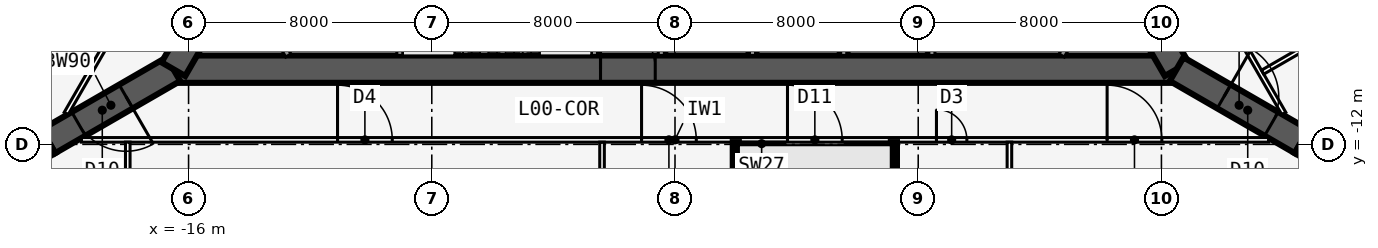
"""IFC4 building model, lengths in metres.
Left out: names, types, materials, properties, quantities, classifications, styles, units other than length and angle.
Written with IfcOpenShell. Run it as: python <this file> out.ifc"""

import sys

from ifc_helpers import new_model, si_unit, direction, frame, frame_2d, origin, place, context, subcontext, project, spatial, rectangle, extrude, element, fill, save


model = new_model("IFC4")
c1 = context("Model", 3, precision=1e-05, world=origin(), true_north=direction((0.0, 1.0)))
c2 = subcontext(c1, "Body", "Model", "MODEL_VIEW")
j1 = project(units=[si_unit("LENGTHUNIT", "METRE"), si_unit("PLANEANGLEUNIT", "RADIAN")], contexts=[c1])
p1 = place(None, origin())
s1 = spatial("IfcSite", under=j1, at=p1, CompositionType="ELEMENT")
p2 = place(p1, origin())
s2 = spatial("IfcBuilding", under=s1, at=p2, CompositionType="ELEMENT")
p3 = place(p2, origin())
s3 = spatial("IfcBuildingStorey", under=s2, at=p3, CompositionType="ELEMENT", Elevation=0.0)
p4 = place(p3, frame((-16.5, -9.526, -0.3), z_axis=(0.0, 0.0, 1.0), x_axis=(1.0, 0.0, 0.0)))
e1 = element("IfcWall", 1, at=p4, inside=s3, PredefinedType="SHEAR", context=c2, shape_type="SweptSolid", body=[
    extrude(rectangle(XDim=33.0, YDim=0.9, at=frame_2d((16.5, 0.0))), origin(), (0.0, 0.0, 1.0), 6.3),
])
p5 = place(p4, frame((14.05, 0.0, 0.3)))
e2 = element("IfcOpeningElement", 2, at=p5, cuts=e1, PredefinedType="OPENING", context=c2, shape_type="SweptSolid", body=[
    extrude(rectangle(XDim=1.8, YDim=2.13, at=frame_2d((0.9, 1.065))), frame((0.0, 0.46, 0.0), z_axis=(0.0, -1.0, 0.0), x_axis=(1.0, 0.0, 0.0)), (0.0, 0.0, 1.0), 0.92),
])
p6 = place(p3, frame((-9.05, -5.951, -0.3), z_axis=(0.0, 0.0, 1.0), x_axis=(0.0, -1.0, 0.0)))
e3 = element("IfcWall", 3, at=p6, inside=s3, PredefinedType="SOLIDWALL", context=c2, shape_type="SweptSolid", body=[
    extrude(rectangle(XDim=3.125, YDim=0.2, at=frame_2d((1.562, 0.0))), origin(), (0.0, 0.0, 1.0), 6.05),
])
p7 = place(p3, frame((-2.65, -5.951, -0.3), z_axis=(0.0, 0.0, 1.0), x_axis=(0.0, -1.0, 0.0)))
e4 = element("IfcWall", 4, at=p7, inside=s3, PredefinedType="SOLIDWALL", context=c2, shape_type="SweptSolid", body=[
    extrude(rectangle(XDim=3.125, YDim=0.2, at=frame_2d((1.562, 0.0))), origin(), (0.0, 0.0, 1.0), 6.05),
])
p8 = place(p7, frame((1.525, 0.0, 0.3)))
e5 = element("IfcOpeningElement", 5, at=p8, cuts=e4, PredefinedType="OPENING", context=c2, shape_type="SweptSolid", body=[
    extrude(rectangle(XDim=1.0, YDim=2.13, at=frame_2d((0.5, 1.065))), frame((0.0, 0.11, 0.0), z_axis=(0.0, -1.0, 0.0), x_axis=(1.0, 0.0, 0.0)), (0.0, 0.0, 1.0), 0.22),
])
for number, where, z_axis, x_axis in (
    (6, (-0.45, -5.951, -0.3), (0.0, 0.0, 1.0), (0.0, -1.0, 0.0)),
    (7, (2.55, -5.951, -0.3), (0.0, 0.0, 1.0), (0.0, -1.0, 0.0)),
    (8, (5.55, -5.951, -0.3), (0.0, 0.0, 1.0), (0.0, -1.0, 0.0)),
    (9, (8.45, -5.951, -0.3), (0.0, 0.0, 1.0), (0.0, -1.0, 0.0)),
):
    element("IfcWall", number, at=place(p3, frame(where, z_axis=z_axis, x_axis=x_axis)), inside=s3, PredefinedType="SOLIDWALL", context=c2, shape_type="SweptSolid", body=[
        extrude(rectangle(XDim=3.125, YDim=0.2, at=frame_2d((1.562, 0.0))), origin(), (0.0, 0.0, 1.0), 6.05),
    ])
p9 = place(p3, frame((16.5, -9.526, -0.3), z_axis=(0.0, 0.0, 1.0), x_axis=(-0.499999749417, 0.866025548458, 0.0)))
e10 = element("IfcWall", 10, at=p9, inside=s3, PredefinedType="SHEAR", context=c2, shape_type="SweptSolid", body=[
    extrude(rectangle(XDim=33.0, YDim=0.9, at=frame_2d((16.5, 0.0))), origin(), (0.0, 0.0, 1.0), 6.3),
])
p10 = place(p9, frame((14.15, 0.0, 0.3)))
e11 = element("IfcOpeningElement", 11, at=p10, cuts=e10, PredefinedType="OPENING", context=c2, shape_type="SweptSolid", body=[
    extrude(rectangle(XDim=1.8, YDim=2.13, at=frame_2d((0.9, 1.065))), frame((0.0, 0.46, 0.0), z_axis=(0.0, -1.0, 0.0), x_axis=(1.0, 0.0, 0.0)), (0.0, 0.0, 1.0), 0.92),
])
p11 = place(p9, frame((12.6, 0.0, 0.3)))
e12 = element("IfcOpeningElement", 12, at=p11, cuts=e10, PredefinedType="OPENING", context=c2, shape_type="SweptSolid", body=[
    extrude(rectangle(XDim=1.0, YDim=2.13, at=frame_2d((0.5, 1.065))), frame((0.0, 0.46, 0.0), z_axis=(0.0, -1.0, 0.0), x_axis=(1.0, 0.0, 0.0)), (0.0, 0.0, 1.0), 0.92),
])
p12 = place(p3, frame((0.0, 19.052, -0.3), z_axis=(0.0, 0.0, 1.0), x_axis=(-0.499999749417, -0.866025548458, 0.0)))
e13 = element("IfcWall", 13, at=p12, inside=s3, PredefinedType="SHEAR", context=c2, shape_type="SweptSolid", body=[
    extrude(rectangle(XDim=33.0, YDim=0.9, at=frame_2d((16.5, 0.0))), origin(), (0.0, 0.0, 1.0), 6.3),
])
p13 = place(p12, frame((14.15, 0.0, 0.3)))
e14 = element("IfcOpeningElement", 14, at=p13, cuts=e13, PredefinedType="OPENING", context=c2, shape_type="SweptSolid", body=[
    extrude(rectangle(XDim=1.8, YDim=2.13, at=frame_2d((0.9, 1.065))), frame((0.0, 0.46, 0.0), z_axis=(0.0, -1.0, 0.0), x_axis=(1.0, 0.0, 0.0)), (0.0, 0.0, 1.0), 0.92),
])
p14 = place(p12, frame((12.6, 0.0, 0.3)))
e15 = element("IfcOpeningElement", 15, at=p14, cuts=e13, PredefinedType="OPENING", context=c2, shape_type="SweptSolid", body=[
    extrude(rectangle(XDim=1.0, YDim=2.13, at=frame_2d((0.5, 1.065))), frame((0.0, 0.46, 0.0), z_axis=(0.0, -1.0, 0.0), x_axis=(1.0, 0.0, 0.0)), (0.0, 0.0, 1.0), 0.92),
])
p15 = place(p3, frame((16.5, -9.526, -0.3), z_axis=(0.0, 0.0, 1.0), x_axis=(0.866031398331, -0.499989616998, 0.0)))
e16 = element("IfcWall", 16, at=p15, inside=s3, PredefinedType="SHEAR", context=c2, shape_type="SweptSolid", body=[
    extrude(rectangle(XDim=4.746, YDim=0.9, at=frame_2d((2.373, 0.0))), origin(), (0.0, 0.0, 1.0), 6.3),
])
p16 = place(p15, frame((1.8, 0.0, 0.3)))
e17 = element("IfcOpeningElement", 17, at=p16, cuts=e16, PredefinedType="OPENING", context=c2, shape_type="SweptSolid", body=[
    extrude(rectangle(XDim=1.8, YDim=2.13, at=frame_2d((0.9, 1.065))), frame((0.0, 0.46, 0.0), z_axis=(0.0, -1.0, 0.0), x_axis=(1.0, 0.0, 0.0)), (0.0, 0.0, 1.0), 0.92),
])
p17 = place(p3, frame((20.61, -11.899, -0.3), z_axis=(0.0, 0.0, 1.0), x_axis=(0.866009537788, -0.500027479704, 0.0)))
e18 = element("IfcWall", 18, at=p17, inside=s3, PredefinedType="SHEAR", context=c2, shape_type="SweptSolid", body=[
    extrude(rectangle(XDim=1.155, YDim=0.9, at=frame_2d((0.577, 0.0))), origin(), (0.0, 0.0, 1.0), 6.3),
])
p18 = place(p3, frame((-16.5, -9.526, -0.3), z_axis=(0.0, 0.0, 1.0), x_axis=(-0.866031398331, -0.499989616998, 0.0)))
e19 = element("IfcWall", 19, at=p18, inside=s3, PredefinedType="SHEAR", context=c2, shape_type="SweptSolid", body=[
    extrude(rectangle(XDim=4.746, YDim=0.9, at=frame_2d((2.373, 0.0))), origin(), (0.0, 0.0, 1.0), 6.3),
])
p19 = place(p18, frame((1.8, 0.0, 0.3)))
e20 = element("IfcOpeningElement", 20, at=p19, cuts=e19, PredefinedType="OPENING", context=c2, shape_type="SweptSolid", body=[
    extrude(rectangle(XDim=1.8, YDim=2.13, at=frame_2d((0.9, 1.065))), frame((0.0, 0.46, 0.0), z_axis=(0.0, -1.0, 0.0), x_axis=(1.0, 0.0, 0.0)), (0.0, 0.0, 1.0), 0.92),
])
p20 = place(p3, frame((-20.61, -11.899, -0.3), z_axis=(0.0, 0.0, 1.0), x_axis=(-0.866009537788, -0.500027479704, 0.0)))
e21 = element("IfcWall", 21, at=p20, inside=s3, PredefinedType="SHEAR", context=c2, shape_type="SweptSolid", body=[
    extrude(rectangle(XDim=1.155, YDim=0.9, at=frame_2d((0.577, 0.0))), origin(), (0.0, 0.0, 1.0), 6.3),
])
p21 = place(p3, frame((-19.527, -11.851, -0.3), z_axis=(0.0, 0.0, 1.0), x_axis=(1.0, 0.0, 0.0)))
e22 = element("IfcWall", 22, at=p21, inside=s3, PredefinedType="PARTITIONING", context=c2, shape_type="SweptSolid", body=[
    extrude(rectangle(XDim=39.054, YDim=0.15, at=frame_2d((19.527, 0.0))), origin(), (0.0, 0.0, 1.0), 5.108),
])
p22 = place(p21, frame((8.427, 0.0, 0.3)))
e23 = element("IfcOpeningElement", 23, at=p22, cuts=e22, PredefinedType="OPENING", context=c2, shape_type="SweptSolid", body=[
    extrude(rectangle(XDim=1.8, YDim=2.13, at=frame_2d((0.9, 1.065))), frame((0.0, 0.085, 0.0), z_axis=(0.0, -1.0, 0.0), x_axis=(1.0, 0.0, 0.0)), (0.0, 0.0, 1.0), 0.17),
])
p23 = place(p21, frame((18.427, 0.0, 0.3)))
e24 = element("IfcOpeningElement", 24, at=p23, cuts=e22, PredefinedType="OPENING", context=c2, shape_type="SweptSolid", body=[
    extrude(rectangle(XDim=1.8, YDim=2.13, at=frame_2d((0.9, 1.065))), frame((0.0, 0.085, 0.0), z_axis=(0.0, -1.0, 0.0), x_axis=(1.0, 0.0, 0.0)), (0.0, 0.0, 1.0), 0.17),
])
p24 = place(p21, frame((23.227, 0.0, 0.3)))
e25 = element("IfcOpeningElement", 25, at=p24, cuts=e22, PredefinedType="OPENING", context=c2, shape_type="SweptSolid", body=[
    extrude(rectangle(XDim=1.8, YDim=2.13, at=frame_2d((0.9, 1.065))), frame((0.0, 0.085, 0.0), z_axis=(0.0, -1.0, 0.0), x_axis=(1.0, 0.0, 0.0)), (0.0, 0.0, 1.0), 0.17),
])
p25 = place(p21, frame((28.127, 0.0, 0.3)))
e26 = element("IfcOpeningElement", 26, at=p25, cuts=e22, PredefinedType="OPENING", context=c2, shape_type="SweptSolid", body=[
    extrude(rectangle(XDim=1.0, YDim=2.13, at=frame_2d((0.5, 1.065))), frame((0.0, 0.085, 0.0), z_axis=(0.0, -1.0, 0.0), x_axis=(1.0, 0.0, 0.0)), (0.0, 0.0, 1.0), 0.17),
])
p26 = place(p21, frame((33.74, 0.0, 0.3)))
e27 = element("IfcOpeningElement", 27, at=p26, cuts=e22, PredefinedType="OPENING", context=c2, shape_type="SweptSolid", body=[
    extrude(rectangle(XDim=1.8, YDim=2.13, at=frame_2d((0.9, 1.065))), frame((0.0, 0.085, 0.0), z_axis=(0.0, -1.0, 0.0), x_axis=(1.0, 0.0, 0.0)), (0.0, 0.0, 1.0), 0.17),
])
p27 = place(p3, frame((-18.0, -11.926, -0.3), z_axis=(0.0, 0.0, 1.0), x_axis=(0.0, -1.0, 0.0)))
e28 = element("IfcWall", 28, at=p27, inside=s3, PredefinedType="PARTITIONING", context=c2, shape_type="SweptSolid", body=[
    extrude(rectangle(XDim=20.399, YDim=0.15, at=frame_2d((10.2, 0.0))), origin(), (0.0, 0.0, 1.0), 6.05),
])
p28 = place(p3, frame((-2.4, -11.926, -0.3), z_axis=(0.0, 0.0, 1.0), x_axis=(0.0, -1.0, 0.0)))
e29 = element("IfcWall", 29, at=p28, inside=s3, PredefinedType="PARTITIONING", context=c2, shape_type="SweptSolid", body=[
    extrude(rectangle(XDim=20.79, YDim=0.15, at=frame_2d((10.395, 0.0))), origin(), (0.0, 0.0, 1.0), 6.05),
])
p29 = place(p3, frame((2.0, -11.926, -0.3), z_axis=(0.0, 0.0, 1.0), x_axis=(0.0, -1.0, 0.0)))
e30 = element("IfcWall", 30, at=p29, inside=s3, PredefinedType="SHEAR", context=c2, shape_type="SweptSolid", body=[
    extrude(rectangle(XDim=20.795, YDim=0.2, at=frame_2d((10.397, 0.0))), origin(), (0.0, 0.0, 1.0), 6.3),
])
p30 = place(p3, frame((7.2, -11.926, -0.3), z_axis=(0.0, 0.0, 1.0), x_axis=(0.0, -1.0, 0.0)))
e31 = element("IfcWall", 31, at=p30, inside=s3, PredefinedType="SHEAR", context=c2, shape_type="SweptSolid", body=[
    extrude(rectangle(XDim=20.734, YDim=0.2, at=frame_2d((10.367, 0.0))), origin(), (0.0, 0.0, 1.0), 6.3),
])
p31 = place(p3, frame((11.0, -11.926, -0.3), z_axis=(0.0, 0.0, 1.0), x_axis=(0.0, -1.0, 0.0)))
e32 = element("IfcWall", 32, at=p31, inside=s3, PredefinedType="PARTITIONING", context=c2, shape_type="SweptSolid", body=[
    extrude(rectangle(XDim=20.644, YDim=0.15, at=frame_2d((10.322, 0.0))), origin(), (0.0, 0.0, 1.0), 6.05),
])
p32 = place(p3, frame((20.027, -10.985, -0.3), z_axis=(0.0, 0.0, 1.0), x_axis=(-0.500001677587, 0.866024435227, 0.0)))
e33 = element("IfcWall", 33, at=p32, inside=s3, PredefinedType="PARTITIONING", context=c2, shape_type="SweptSolid", body=[
    extrude(rectangle(XDim=39.054, YDim=0.15, at=frame_2d((19.527, 0.0))), origin(), (0.0, 0.0, 1.0), 5.108),
])
p33 = place(p32, frame((8.427, 0.0, 0.3)))
e34 = element("IfcOpeningElement", 34, at=p33, cuts=e33, PredefinedType="OPENING", context=c2, shape_type="SweptSolid", body=[
    extrude(rectangle(XDim=1.8, YDim=2.13, at=frame_2d((0.9, 1.065))), frame((0.0, 0.085, 0.0), z_axis=(0.0, -1.0, 0.0), x_axis=(1.0, 0.0, 0.0)), (0.0, 0.0, 1.0), 0.17),
])
p34 = place(p32, frame((18.427, 0.0, 0.3)))
e35 = element("IfcOpeningElement", 35, at=p34, cuts=e33, PredefinedType="OPENING", context=c2, shape_type="SweptSolid", body=[
    extrude(rectangle(XDim=1.8, YDim=2.13, at=frame_2d((0.9, 1.065))), frame((0.0, 0.085, 0.0), z_axis=(0.0, -1.0, 0.0), x_axis=(1.0, 0.0, 0.0)), (0.0, 0.0, 1.0), 0.17),
])
p35 = place(p32, frame((23.227, 0.0, 0.3)))
e36 = element("IfcOpeningElement", 36, at=p35, cuts=e33, PredefinedType="OPENING", context=c2, shape_type="SweptSolid", body=[
    extrude(rectangle(XDim=1.8, YDim=2.13, at=frame_2d((0.9, 1.065))), frame((0.0, 0.085, 0.0), z_axis=(0.0, -1.0, 0.0), x_axis=(1.0, 0.0, 0.0)), (0.0, 0.0, 1.0), 0.17),
])
p36 = place(p32, frame((27.627, 0.0, 0.3)))
e37 = element("IfcOpeningElement", 37, at=p36, cuts=e33, PredefinedType="OPENING", context=c2, shape_type="SweptSolid", body=[
    extrude(rectangle(XDim=1.0, YDim=2.13, at=frame_2d((0.5, 1.065))), frame((0.0, 0.085, 0.0), z_axis=(0.0, -1.0, 0.0), x_axis=(1.0, 0.0, 0.0)), (0.0, 0.0, 1.0), 0.17),
])
p37 = place(p32, frame((30.527, 0.0, 0.3)))
e38 = element("IfcOpeningElement", 38, at=p37, cuts=e33, PredefinedType="OPENING", context=c2, shape_type="SweptSolid", body=[
    extrude(rectangle(XDim=1.0, YDim=2.13, at=frame_2d((0.5, 1.065))), frame((0.0, 0.085, 0.0), z_axis=(0.0, -1.0, 0.0), x_axis=(1.0, 0.0, 0.0)), (0.0, 0.0, 1.0), 0.17),
])
p38 = place(p32, frame((33.277, 0.0, 0.3)))
e39 = element("IfcOpeningElement", 39, at=p38, cuts=e33, PredefinedType="OPENING", context=c2, shape_type="SweptSolid", body=[
    extrude(rectangle(XDim=1.0, YDim=2.13, at=frame_2d((0.5, 1.065))), frame((0.0, 0.085, 0.0), z_axis=(0.0, -1.0, 0.0), x_axis=(1.0, 0.0, 0.0)), (0.0, 0.0, 1.0), 0.17),
])
p39 = place(p32, frame((36.39, 0.0, 0.3)))
e40 = element("IfcOpeningElement", 40, at=p39, cuts=e33, PredefinedType="OPENING", context=c2, shape_type="SweptSolid", body=[
    extrude(rectangle(XDim=1.0, YDim=2.13, at=frame_2d((0.5, 1.065))), frame((0.0, 0.085, 0.0), z_axis=(0.0, -1.0, 0.0), x_axis=(1.0, 0.0, 0.0)), (0.0, 0.0, 1.0), 0.17),
])
p40 = place(p3, frame((19.329, -9.625, -0.3), z_axis=(0.0, 0.0, 1.0), x_axis=(0.866023552797, 0.500003205991, 0.0)))
e41 = element("IfcWall", 41, at=p40, inside=s3, PredefinedType="PARTITIONING", context=c2, shape_type="SweptSolid", body=[
    extrude(rectangle(XDim=20.399, YDim=0.15, at=frame_2d((10.2, 0.0))), origin(), (0.0, 0.0, 1.0), 6.05),
])
p41 = place(p3, frame((-0.5, 22.836, -0.3), z_axis=(0.0, 0.0, 1.0), x_axis=(-0.500001677587, -0.866024435227, 0.0)))
e42 = element("IfcWall", 42, at=p41, inside=s3, PredefinedType="PARTITIONING", context=c2, shape_type="SweptSolid", body=[
    extrude(rectangle(XDim=39.054, YDim=0.15, at=frame_2d((19.527, 0.0))), origin(), (0.0, 0.0, 1.0), 5.108),
])
p42 = place(p41, frame((2.013, 0.0, 0.3)))
e43 = element("IfcOpeningElement", 43, at=p42, cuts=e42, PredefinedType="OPENING", context=c2, shape_type="SweptSolid", body=[
    extrude(rectangle(XDim=1.8, YDim=2.13, at=frame_2d((0.9, 1.065))), frame((0.0, 0.085, 0.0), z_axis=(0.0, -1.0, 0.0), x_axis=(1.0, 0.0, 0.0)), (0.0, 0.0, 1.0), 0.17),
])
p43 = place(p41, frame((10.427, 0.0, 0.3)))
e44 = element("IfcOpeningElement", 44, at=p43, cuts=e42, PredefinedType="OPENING", context=c2, shape_type="SweptSolid", body=[
    extrude(rectangle(XDim=1.8, YDim=2.13, at=frame_2d((0.9, 1.065))), frame((0.0, 0.085, 0.0), z_axis=(0.0, -1.0, 0.0), x_axis=(1.0, 0.0, 0.0)), (0.0, 0.0, 1.0), 0.17),
])
p44 = place(p41, frame((18.427, 0.0, 0.3)))
e45 = element("IfcOpeningElement", 45, at=p44, cuts=e42, PredefinedType="OPENING", context=c2, shape_type="SweptSolid", body=[
    extrude(rectangle(XDim=1.8, YDim=2.13, at=frame_2d((0.9, 1.065))), frame((0.0, 0.085, 0.0), z_axis=(0.0, -1.0, 0.0), x_axis=(1.0, 0.0, 0.0)), (0.0, 0.0, 1.0), 0.17),
])
p45 = place(p41, frame((23.227, 0.0, 0.3)))
e46 = element("IfcOpeningElement", 46, at=p45, cuts=e42, PredefinedType="OPENING", context=c2, shape_type="SweptSolid", body=[
    extrude(rectangle(XDim=1.8, YDim=2.13, at=frame_2d((0.9, 1.065))), frame((0.0, 0.085, 0.0), z_axis=(0.0, -1.0, 0.0), x_axis=(1.0, 0.0, 0.0)), (0.0, 0.0, 1.0), 0.17),
])
p46 = place(p41, frame((27.627, 0.0, 0.3)))
e47 = element("IfcOpeningElement", 47, at=p46, cuts=e42, PredefinedType="OPENING", context=c2, shape_type="SweptSolid", body=[
    extrude(rectangle(XDim=1.0, YDim=2.13, at=frame_2d((0.5, 1.065))), frame((0.0, 0.085, 0.0), z_axis=(0.0, -1.0, 0.0), x_axis=(1.0, 0.0, 0.0)), (0.0, 0.0, 1.0), 0.17),
])
p47 = place(p41, frame((30.277, 0.0, 0.3)))
e48 = element("IfcOpeningElement", 48, at=p47, cuts=e42, PredefinedType="OPENING", context=c2, shape_type="SweptSolid", body=[
    extrude(rectangle(XDim=1.0, YDim=2.13, at=frame_2d((0.5, 1.065))), frame((0.0, 0.085, 0.0), z_axis=(0.0, -1.0, 0.0), x_axis=(1.0, 0.0, 0.0)), (0.0, 0.0, 1.0), 0.17),
])
p48 = place(p41, frame((34.89, 0.0, 0.3)))
e49 = element("IfcOpeningElement", 49, at=p48, cuts=e42, PredefinedType="OPENING", context=c2, shape_type="SweptSolid", body=[
    extrude(rectangle(XDim=1.0, YDim=2.13, at=frame_2d((0.5, 1.065))), frame((0.0, 0.085, 0.0), z_axis=(0.0, -1.0, 0.0), x_axis=(1.0, 0.0, 0.0)), (0.0, 0.0, 1.0), 0.17),
])
for number, where, z_axis, x_axis in (
    (50, (14.219, -6.476, -0.3), (0.0, 0.0, 1.0), (-0.5, -0.866, 0.0)),
    (51, (-12.719, -9.076, -0.3), (0.0, 0.0, 1.0), (-0.5, 0.866, 0.0)),
):
    element("IfcWall", number, at=place(p3, frame(where, z_axis=z_axis, x_axis=x_axis)), inside=s3, PredefinedType="SOLIDWALL", context=c2, shape_type="SweptSolid", body=[
        extrude(rectangle(XDim=3.002, YDim=0.2, at=frame_2d((1.501, 0.0))), origin(), (0.0, 0.0, 1.0), 6.05),
    ])
for number, where, z_axis, x_axis in (
    (52, (2.1, -11.976, -0.3), (0.0, 0.0, 1.0), (1.0, 0.0, 0.0)),
    (53, (5.6, -11.976, -0.3), (0.0, 0.0, 1.0), (1.0, 0.0, 0.0)),
):
    element("IfcWall", number, at=place(p3, frame(where, z_axis=z_axis, x_axis=x_axis)), inside=s3, PredefinedType="SOLIDWALL", context=c2, shape_type="SweptSolid", body=[
        extrude(rectangle(XDim=1.5, YDim=0.1, at=frame_2d((0.75, 0.0))), origin(), (0.0, 0.0, 1.0), 6.3),
    ])
p49 = place(p22, origin())
e54 = element("IfcDoor", 54, at=p49, inside=s3, OperationType="DOUBLE_DOOR_SINGLE_SWING", PredefinedType="DOOR", context=c2, shape_type="SweptSolid", body=[
    extrude(rectangle(XDim=1.8, YDim=2.13, at=frame_2d((0.9, 1.065))), frame((0.0, 0.025, 0.0), z_axis=(0.0, -1.0, 0.0), x_axis=(1.0, 0.0, 0.0)), (0.0, 0.0, 1.0), 0.05),
])
fill(e23, e54)
p50 = place(p23, origin())
e55 = element("IfcDoor", 55, at=p50, inside=s3, OperationType="DOUBLE_DOOR_SINGLE_SWING", PredefinedType="DOOR", context=c2, shape_type="SweptSolid", body=[
    extrude(rectangle(XDim=1.8, YDim=2.13, at=frame_2d((0.9, 1.065))), frame((0.0, 0.025, 0.0), z_axis=(0.0, -1.0, 0.0), x_axis=(1.0, 0.0, 0.0)), (0.0, 0.0, 1.0), 0.05),
])
fill(e24, e55)
p51 = place(p24, origin())
e56 = element("IfcDoor", 56, at=p51, inside=s3, OperationType="DOUBLE_DOOR_SINGLE_SWING", PredefinedType="DOOR", context=c2, shape_type="SweptSolid", body=[
    extrude(rectangle(XDim=1.8, YDim=2.13, at=frame_2d((0.9, 1.065))), frame((0.0, 0.025, 0.0), z_axis=(0.0, -1.0, 0.0), x_axis=(1.0, 0.0, 0.0)), (0.0, 0.0, 1.0), 0.05),
])
fill(e25, e56)
p52 = place(p25, origin())
e57 = element("IfcDoor", 57, at=p52, inside=s3, OperationType="SINGLE_SWING_LEFT", PredefinedType="DOOR", context=c2, shape_type="SweptSolid", body=[
    extrude(rectangle(XDim=1.0, YDim=2.13, at=frame_2d((0.5, 1.065))), frame((0.0, 0.025, 0.0), z_axis=(0.0, -1.0, 0.0), x_axis=(1.0, 0.0, 0.0)), (0.0, 0.0, 1.0), 0.05),
])
fill(e26, e57)
p53 = place(p26, origin())
e58 = element("IfcDoor", 58, at=p53, inside=s3, OperationType="DOUBLE_DOOR_SINGLE_SWING", PredefinedType="DOOR", context=c2, shape_type="SweptSolid", body=[
    extrude(rectangle(XDim=1.8, YDim=2.13, at=frame_2d((0.9, 1.065))), frame((0.0, 0.025, 0.0), z_axis=(0.0, -1.0, 0.0), x_axis=(1.0, 0.0, 0.0)), (0.0, 0.0, 1.0), 0.05),
])
fill(e27, e58)
p54 = place(p5, origin())
e59 = element("IfcDoor", 59, at=p54, inside=s3, OperationType="DOUBLE_DOOR_SINGLE_SWING", PredefinedType="DOOR", context=c2, shape_type="SweptSolid", body=[
    extrude(rectangle(XDim=1.8, YDim=2.13, at=frame_2d((0.9, 1.065))), frame((0.0, 0.025, 0.0), z_axis=(0.0, -1.0, 0.0), x_axis=(1.0, 0.0, 0.0)), (0.0, 0.0, 1.0), 0.05),
])
fill(e2, e59)
p55 = place(p16, origin())
e60 = element("IfcDoor", 60, at=p55, inside=s3, OperationType="DOUBLE_DOOR_DOUBLE_SWING", PredefinedType="DOOR", context=c2, shape_type="SweptSolid", body=[
    extrude(rectangle(XDim=1.8, YDim=2.13, at=frame_2d((0.9, 1.065))), frame((0.0, 0.025, 0.0), z_axis=(0.0, -1.0, 0.0), x_axis=(1.0, 0.0, 0.0)), (0.0, 0.0, 1.0), 0.05),
])
fill(e17, e60)
p56 = place(p19, origin())
e61 = element("IfcDoor", 61, at=p56, inside=s3, OperationType="DOUBLE_DOOR_DOUBLE_SWING", PredefinedType="DOOR", context=c2, shape_type="SweptSolid", body=[
    extrude(rectangle(XDim=1.8, YDim=2.13, at=frame_2d((0.9, 1.065))), frame((0.0, 0.025, 0.0), z_axis=(0.0, -1.0, 0.0), x_axis=(1.0, 0.0, 0.0)), (0.0, 0.0, 1.0), 0.05),
])
fill(e20, e61)
save(model, sys.argv[1])
